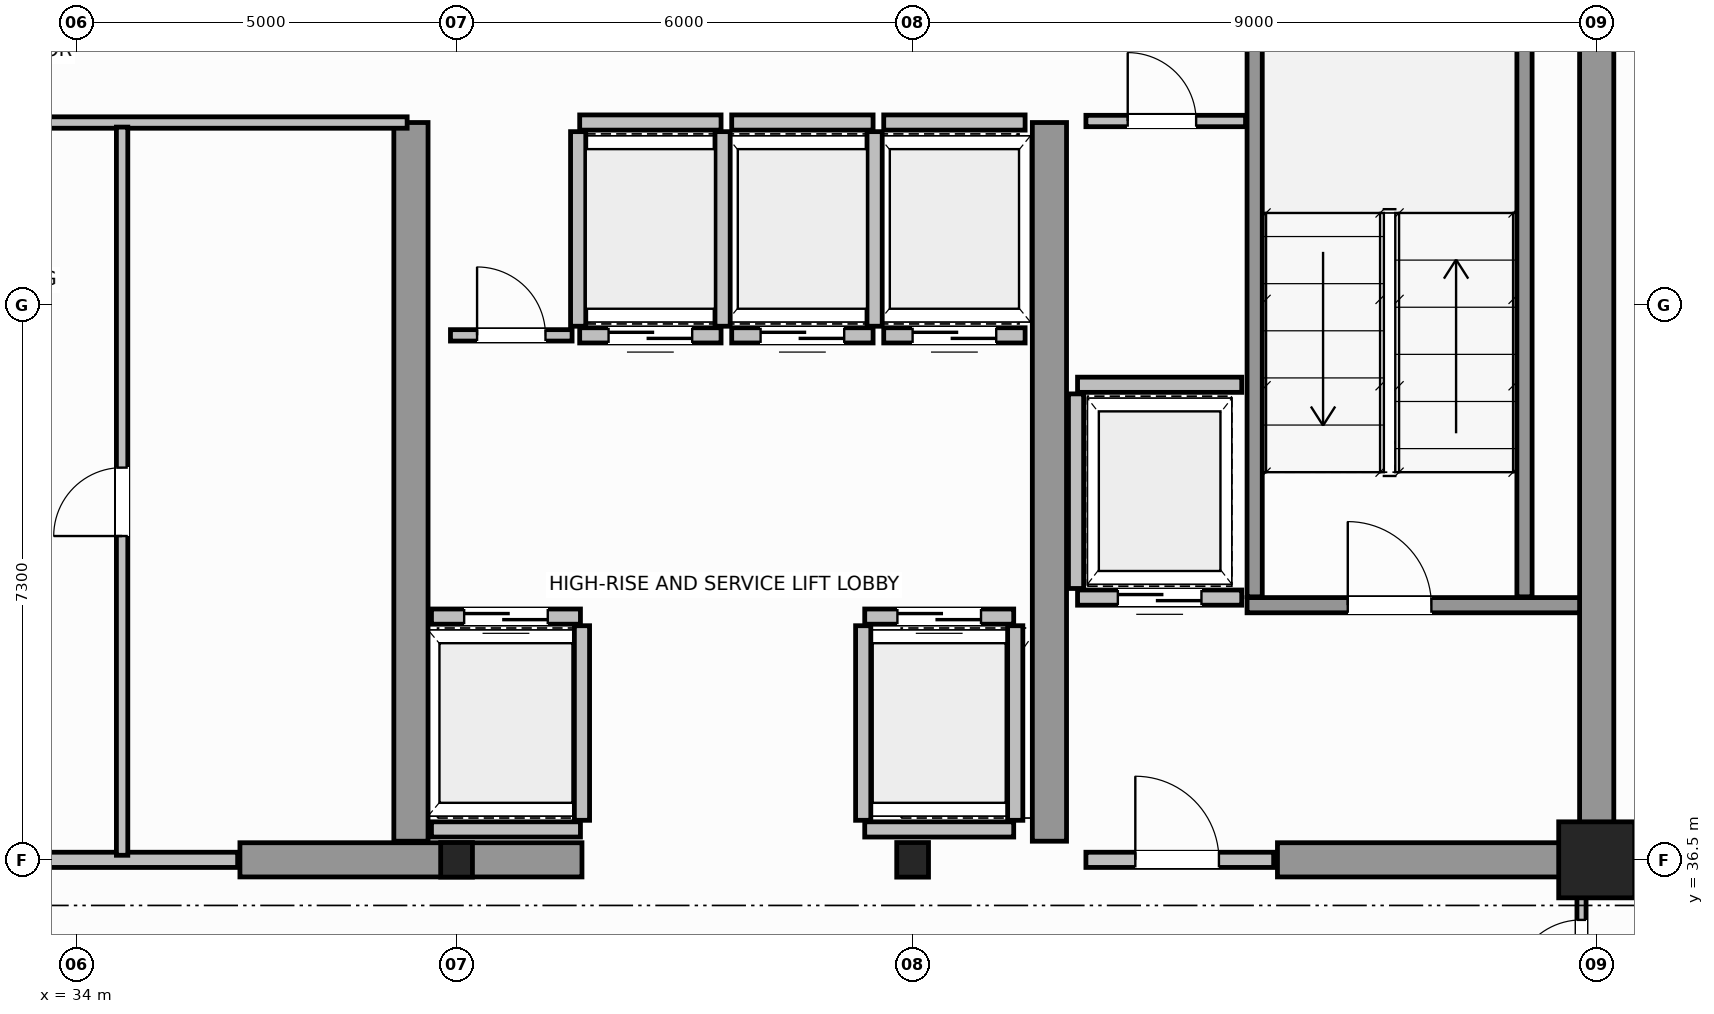
"""IFC4 building model, lengths in metres.
Left out: names, types, materials, properties, quantities, classifications, styles, units other than length and angle.
Written with IfcOpenShell. Run it as: python <this file> out.ifc"""

import sys

from ifc_helpers import new_model, si_unit, direction, frame, frame_2d, origin, origin_2d, place, context, subcontext, project, spatial, rectangle, i_section, extrude, source, transform, mapped, element, fill, save


model = new_model("IFC4")
c1 = context("Model", 3, precision=1e-05, world=origin(), true_north=direction((0.0, 1.0)))
c2 = subcontext(c1, "Body", "Model", "MODEL_VIEW")
j1 = project(units=[si_unit("LENGTHUNIT", "METRE"), si_unit("PLANEANGLEUNIT", "RADIAN")], contexts=[c1])
p1 = place(None, origin())
s1 = spatial("IfcSite", under=j1, at=p1, CompositionType="ELEMENT")
p2 = place(p1, origin())
s2 = spatial("IfcBuilding", under=s1, at=p2, CompositionType="ELEMENT")
p3 = place(p2, frame((0.0, 0.0, 249.8)))
s3 = spatial("IfcBuildingStorey", under=s2, at=p3, CompositionType="ELEMENT", Elevation=249.8)
m1 = source(origin(), c2, "Body", "SweptSolid", [
    extrude(i_section(OverallWidth=0.418, OverallDepth=0.455, WebThickness=0.042, FlangeThickness=0.058, FilletRadius=0.015, at=origin_2d()), origin(), (0.0, 0.0, 1.0), 3.8),
])
for number, where, z_axis, x_axis in (
    (1, (39.0, 36.5, 0.0), (0.0, 0.0, 1.0), (1.0, 0.0, 0.0)),
    (2, (45.0, 36.5, 0.0), (0.0, 0.0, 1.0), (1.0, 0.0, 0.0)),
):
    element("IfcColumn", number, at=place(p3, frame(where, z_axis=z_axis, x_axis=x_axis)), inside=s3, PredefinedType="COLUMN", context=c2, shape_type="MappedRepresentation", body=[
        mapped(m1, transform((0.0, 0.0, 0.0), scale=1.0)),
    ])
m2 = source(origin(), c2, "Body", "SweptSolid", [
    extrude(rectangle(XDim=1.0, YDim=1.0, at=origin_2d()), origin(), (0.0, 0.0, 1.0), 3.8),
])
p4 = place(p3, frame((54.0, 36.5, 0.0), z_axis=(0.0, 0.0, 1.0), x_axis=(1.0, 0.0, 0.0)))
e3 = element("IfcColumn", 3, at=p4, inside=s3, PredefinedType="COLUMN", context=c2, shape_type="MappedRepresentation", body=[
    mapped(m2, transform((0.0, 0.0, 0.0), scale=1.0)),
])
p5 = place(p3, frame((54.0, 36.5, 0.0), z_axis=(0.0, 0.0, 1.0), x_axis=(0.0, 1.0, 0.0)))
e4 = element("IfcWall", 4, at=p5, inside=s3, PredefinedType="SHEAR", context=c2, shape_type="SweptSolid", body=[
    extrude(rectangle(XDim=14.5, YDim=0.45, at=frame_2d((7.25, 0.0))), origin(), (0.0, 0.0, 1.0), 3.8),
])
p6 = place(p3, frame((36.15, 36.5, 0.0), z_axis=(0.0, 0.0, 1.0), x_axis=(1.0, 0.0, 0.0)))
e5 = element("IfcWall", 5, at=p6, inside=s3, PredefinedType="SHEAR", context=c2, shape_type="SweptSolid", body=[
    extrude(rectangle(XDim=4.5, YDim=0.45, at=frame_2d((2.25, 0.0))), origin(), (0.0, 0.0, 1.0), 3.8),
])
p7 = place(p3, frame((49.8, 36.5, 0.0), z_axis=(0.0, 0.0, 1.0), x_axis=(1.0, 0.0, 0.0)))
e6 = element("IfcWall", 6, at=p7, inside=s3, PredefinedType="SHEAR", context=c2, shape_type="SweptSolid", body=[
    extrude(rectangle(XDim=3.955, YDim=0.45, at=frame_2d((1.978, 0.0))), origin(), (0.0, 0.0, 1.0), 2.58),
])
for number, where, z_axis, x_axis in (
    (7, (38.4, 36.745, 0.0), (0.0, 0.0, 1.0), (0.0, 1.0, 0.0)),
    (8, (46.8, 36.745, 0.0), (0.0, 0.0, 1.0), (0.0, 1.0, 0.0)),
):
    element("IfcWall", number, at=place(p3, frame(where, z_axis=z_axis, x_axis=x_axis)), inside=s3, PredefinedType="SHEAR", context=c2, shape_type="SweptSolid", body=[
        extrude(rectangle(XDim=9.455, YDim=0.45, at=frame_2d((4.728, 0.0))), origin(), (0.0, 0.0, 1.0), 3.8),
    ])
p8 = place(p3, frame((49.4, 39.85, 0.0), z_axis=(0.0, 0.0, 1.0), x_axis=(1.0, 0.0, 0.0)))
e9 = element("IfcWall", 9, at=p8, inside=s3, PredefinedType="SOLIDWALL", context=c2, shape_type="SweptSolid", body=[
    extrude(rectangle(XDim=4.375, YDim=0.2, at=frame_2d((2.188, 0.0))), origin(), (0.0, 0.0, 1.0), 3.8),
])
p9 = place(p8, frame((1.325, 0.0, 0.0)))
e10 = element("IfcOpeningElement", 10, at=p9, cuts=e9, PredefinedType="OPENING", context=c2, shape_type="SweptSolid", body=[
    extrude(rectangle(XDim=1.1, YDim=2.15, at=frame_2d((0.55, 1.075))), frame((0.0, 0.11, 0.0), z_axis=(0.0, -1.0, 0.0), x_axis=(1.0, 0.0, 0.0)), (0.0, 0.0, 1.0), 0.22),
])
for number, where, z_axis, x_axis in (
    (11, (49.5, 39.96, 0.0), (0.0, 0.0, 1.0), (0.0, 1.0, 0.0)),
    (12, (53.05, 39.96, 0.0), (0.0, 0.0, 1.0), (0.0, 1.0, 0.0)),
):
    element("IfcWall", number, at=place(p3, frame(where, z_axis=z_axis, x_axis=x_axis)), inside=s3, PredefinedType="SOLIDWALL", context=c2, shape_type="SweptSolid", body=[
        extrude(rectangle(XDim=9.93, YDim=0.2, at=frame_2d((4.965, 0.0))), origin(), (0.0, 0.0, 1.0), 3.8),
    ])
p10 = place(p3, frame((47.28, 36.5, 0.0), z_axis=(0.0, 0.0, 1.0), x_axis=(1.0, 0.0, 0.0)))
e13 = element("IfcWall", 13, at=p10, inside=s3, PredefinedType="SOLIDWALL", context=c2, shape_type="SweptSolid", body=[
    extrude(rectangle(XDim=2.47, YDim=0.2, at=frame_2d((1.235, 0.0))), origin(), (0.0, 0.0, 1.0), 2.57),
])
p11 = place(p10, frame((0.65, 0.0, 0.0)))
e14 = element("IfcOpeningElement", 14, at=p11, cuts=e13, PredefinedType="OPENING", context=c2, shape_type="SweptSolid", body=[
    extrude(rectangle(XDim=1.1, YDim=2.15, at=frame_2d((0.55, 1.075))), frame((0.0, 0.11, 0.0), z_axis=(0.0, -1.0, 0.0), x_axis=(1.0, 0.0, 0.0)), (0.0, 0.0, 1.0), 0.22),
])
p12 = place(p3, frame((38.67, 39.7, 0.0), z_axis=(0.0, 0.0, 1.0), x_axis=(1.0, 0.0, 0.0)))
e15 = element("IfcWall", 15, at=p12, inside=s3, PredefinedType="SOLIDWALL", context=c2, shape_type="SweptSolid", body=[
    extrude(rectangle(XDim=1.96, YDim=0.2, at=frame_2d((0.98, 0.0))), origin(), (0.0, 0.0, 1.0), 3.58),
])
p13 = place(p12, frame((0.43, 0.0, 0.0)))
e16 = element("IfcOpeningElement", 16, at=p13, cuts=e15, PredefinedType="OPENING", context=c2, shape_type="SweptSolid", body=[
    extrude(rectangle(XDim=1.1, YDim=2.15, at=frame_2d((0.55, 1.075))), frame((0.0, 0.11, 0.0), z_axis=(0.0, -1.0, 0.0), x_axis=(1.0, 0.0, 0.0)), (0.0, 0.0, 1.0), 0.22),
])
p14 = place(p3, frame((38.67, 36.9, 0.0), z_axis=(0.0, 0.0, 1.0), x_axis=(1.0, 0.0, 0.0)))
e17 = element("IfcWall", 17, at=p14, inside=s3, PredefinedType="SOLIDWALL", context=c2, shape_type="SweptSolid", body=[
    extrude(rectangle(XDim=1.96, YDim=0.2, at=frame_2d((0.98, 0.0))), origin(), (0.0, 0.0, 1.0), 3.58),
])
p15 = place(p3, frame((40.65, 37.02, 0.0), z_axis=(0.0, 0.0, 1.0), x_axis=(0.0, 1.0, 0.0)))
e18 = element("IfcWall", 18, at=p15, inside=s3, PredefinedType="SOLIDWALL", context=c2, shape_type="SweptSolid", body=[
    extrude(rectangle(XDim=2.56, YDim=0.2, at=frame_2d((1.28, 0.0))), origin(), (0.0, 0.0, 1.0), 3.58),
])
p16 = place(p3, frame((44.37, 39.7, 0.0), z_axis=(0.0, 0.0, 1.0), x_axis=(1.0, 0.0, 0.0)))
e19 = element("IfcWall", 19, at=p16, inside=s3, PredefinedType="SOLIDWALL", context=c2, shape_type="SweptSolid", body=[
    extrude(rectangle(XDim=1.96, YDim=0.2, at=frame_2d((0.98, 0.0))), origin(), (0.0, 0.0, 1.0), 3.58),
])
p17 = place(p16, frame((0.43, 0.0, 0.0)))
e20 = element("IfcOpeningElement", 20, at=p17, cuts=e19, PredefinedType="OPENING", context=c2, shape_type="SweptSolid", body=[
    extrude(rectangle(XDim=1.1, YDim=2.15, at=frame_2d((0.55, 1.075))), frame((0.0, 0.11, 0.0), z_axis=(0.0, -1.0, 0.0), x_axis=(1.0, 0.0, 0.0)), (0.0, 0.0, 1.0), 0.22),
])
p18 = place(p3, frame((44.37, 36.9, 0.0), z_axis=(0.0, 0.0, 1.0), x_axis=(1.0, 0.0, 0.0)))
e21 = element("IfcWall", 21, at=p18, inside=s3, PredefinedType="SOLIDWALL", context=c2, shape_type="SweptSolid", body=[
    extrude(rectangle(XDim=1.96, YDim=0.2, at=frame_2d((0.98, 0.0))), origin(), (0.0, 0.0, 1.0), 2.57),
])
for number, where, z_axis, x_axis in (
    (22, (44.35, 37.02, 0.0), (0.0, 0.0, 1.0), (0.0, 1.0, 0.0)),
    (23, (46.35, 37.02, 0.0), (0.0, 0.0, 1.0), (0.0, 1.0, 0.0)),
):
    element("IfcWall", number, at=place(p3, frame(where, z_axis=z_axis, x_axis=x_axis)), inside=s3, PredefinedType="SOLIDWALL", context=c2, shape_type="SweptSolid", body=[
        extrude(rectangle(XDim=2.56, YDim=0.2, at=frame_2d((1.28, 0.0))), origin(), (0.0, 0.0, 1.0), 3.58),
    ])
p19 = place(p3, frame((40.62, 43.4, 0.0), z_axis=(0.0, 0.0, 1.0), x_axis=(1.0, 0.0, 0.0)))
e24 = element("IfcWall", 24, at=p19, inside=s3, PredefinedType="SOLIDWALL", context=c2, shape_type="SweptSolid", body=[
    extrude(rectangle(XDim=1.86, YDim=0.2, at=frame_2d((0.93, 0.0))), origin(), (0.0, 0.0, 1.0), 3.58),
])
p20 = place(p19, frame((0.38, 0.0, 0.0)))
e25 = element("IfcOpeningElement", 25, at=p20, cuts=e24, PredefinedType="OPENING", context=c2, shape_type="SweptSolid", body=[
    extrude(rectangle(XDim=1.1, YDim=2.15, at=frame_2d((0.55, 1.075))), frame((0.0, 0.11, 0.0), z_axis=(0.0, -1.0, 0.0), x_axis=(1.0, 0.0, 0.0)), (0.0, 0.0, 1.0), 0.22),
])
p21 = place(p3, frame((40.62, 46.2, 0.0), z_axis=(0.0, 0.0, 1.0), x_axis=(1.0, 0.0, 0.0)))
e26 = element("IfcWall", 26, at=p21, inside=s3, PredefinedType="SOLIDWALL", context=c2, shape_type="SweptSolid", body=[
    extrude(rectangle(XDim=1.86, YDim=0.2, at=frame_2d((0.93, 0.0))), origin(), (0.0, 0.0, 1.0), 3.58),
])
for number, where, z_axis, x_axis in (
    (27, (40.6, 43.52, 0.0), (0.0, 0.0, 1.0), (0.0, 1.0, 0.0)),
    (28, (42.5, 43.52, 0.0), (0.0, 0.0, 1.0), (0.0, 1.0, 0.0)),
):
    element("IfcWall", number, at=place(p3, frame(where, z_axis=z_axis, x_axis=x_axis)), inside=s3, PredefinedType="SOLIDWALL", context=c2, shape_type="SweptSolid", body=[
        extrude(rectangle(XDim=2.56, YDim=0.2, at=frame_2d((1.28, 0.0))), origin(), (0.0, 0.0, 1.0), 3.58),
    ])
p22 = place(p3, frame((42.62, 43.4, 0.0), z_axis=(0.0, 0.0, 1.0), x_axis=(1.0, 0.0, 0.0)))
e29 = element("IfcWall", 29, at=p22, inside=s3, PredefinedType="SOLIDWALL", context=c2, shape_type="SweptSolid", body=[
    extrude(rectangle(XDim=1.86, YDim=0.2, at=frame_2d((0.93, 0.0))), origin(), (0.0, 0.0, 1.0), 3.58),
])
p23 = place(p22, frame((0.38, 0.0, 0.0)))
e30 = element("IfcOpeningElement", 30, at=p23, cuts=e29, PredefinedType="OPENING", context=c2, shape_type="SweptSolid", body=[
    extrude(rectangle(XDim=1.1, YDim=2.15, at=frame_2d((0.55, 1.075))), frame((0.0, 0.11, 0.0), z_axis=(0.0, -1.0, 0.0), x_axis=(1.0, 0.0, 0.0)), (0.0, 0.0, 1.0), 0.22),
])
p24 = place(p3, frame((42.62, 46.2, 0.0), z_axis=(0.0, 0.0, 1.0), x_axis=(1.0, 0.0, 0.0)))
e31 = element("IfcWall", 31, at=p24, inside=s3, PredefinedType="SOLIDWALL", context=c2, shape_type="SweptSolid", body=[
    extrude(rectangle(XDim=1.86, YDim=0.2, at=frame_2d((0.93, 0.0))), origin(), (0.0, 0.0, 1.0), 3.58),
])
p25 = place(p3, frame((44.5, 43.52, 0.0), z_axis=(0.0, 0.0, 1.0), x_axis=(0.0, 1.0, 0.0)))
e32 = element("IfcWall", 32, at=p25, inside=s3, PredefinedType="SOLIDWALL", context=c2, shape_type="SweptSolid", body=[
    extrude(rectangle(XDim=2.56, YDim=0.2, at=frame_2d((1.28, 0.0))), origin(), (0.0, 0.0, 1.0), 3.58),
])
p26 = place(p3, frame((44.62, 43.4, 0.0), z_axis=(0.0, 0.0, 1.0), x_axis=(1.0, 0.0, 0.0)))
e33 = element("IfcWall", 33, at=p26, inside=s3, PredefinedType="SOLIDWALL", context=c2, shape_type="SweptSolid", body=[
    extrude(rectangle(XDim=1.86, YDim=0.2, at=frame_2d((0.93, 0.0))), origin(), (0.0, 0.0, 1.0), 3.58),
])
p27 = place(p26, frame((0.38, 0.0, 0.0)))
e34 = element("IfcOpeningElement", 34, at=p27, cuts=e33, PredefinedType="OPENING", context=c2, shape_type="SweptSolid", body=[
    extrude(rectangle(XDim=1.1, YDim=2.15, at=frame_2d((0.55, 1.075))), frame((0.0, 0.11, 0.0), z_axis=(0.0, -1.0, 0.0), x_axis=(1.0, 0.0, 0.0)), (0.0, 0.0, 1.0), 0.22),
])
p28 = place(p3, frame((44.62, 46.2, 0.0), z_axis=(0.0, 0.0, 1.0), x_axis=(1.0, 0.0, 0.0)))
e35 = element("IfcWall", 35, at=p28, inside=s3, PredefinedType="SOLIDWALL", context=c2, shape_type="SweptSolid", body=[
    extrude(rectangle(XDim=1.86, YDim=0.2, at=frame_2d((0.93, 0.0))), origin(), (0.0, 0.0, 1.0), 3.58),
])
p29 = place(p3, frame((47.17, 39.95, 0.0), z_axis=(0.0, 0.0, 1.0), x_axis=(1.0, 0.0, 0.0)))
e36 = element("IfcWall", 36, at=p29, inside=s3, PredefinedType="SOLIDWALL", context=c2, shape_type="SweptSolid", body=[
    extrude(rectangle(XDim=2.16, YDim=0.2, at=frame_2d((1.08, 0.0))), origin(), (0.0, 0.0, 1.0), 3.58),
])
p30 = place(p29, frame((0.53, 0.0, 0.0)))
e37 = element("IfcOpeningElement", 37, at=p30, cuts=e36, PredefinedType="OPENING", context=c2, shape_type="SweptSolid", body=[
    extrude(rectangle(XDim=1.1, YDim=2.15, at=frame_2d((0.55, 1.075))), frame((0.0, 0.11, 0.0), z_axis=(0.0, -1.0, 0.0), x_axis=(1.0, 0.0, 0.0)), (0.0, 0.0, 1.0), 0.22),
])
p31 = place(p3, frame((47.17, 42.75, 0.0), z_axis=(0.0, 0.0, 1.0), x_axis=(1.0, 0.0, 0.0)))
e38 = element("IfcWall", 38, at=p31, inside=s3, PredefinedType="SOLIDWALL", context=c2, shape_type="SweptSolid", body=[
    extrude(rectangle(XDim=2.16, YDim=0.2, at=frame_2d((1.08, 0.0))), origin(), (0.0, 0.0, 1.0), 3.58),
])
p32 = place(p3, frame((47.15, 40.07, 0.0), z_axis=(0.0, 0.0, 1.0), x_axis=(0.0, 1.0, 0.0)))
e39 = element("IfcWall", 39, at=p32, inside=s3, PredefinedType="SOLIDWALL", context=c2, shape_type="SweptSolid", body=[
    extrude(rectangle(XDim=2.56, YDim=0.2, at=frame_2d((1.28, 0.0))), origin(), (0.0, 0.0, 1.0), 3.58),
])
p33 = place(p3, frame((32.08, 36.5, 0.0), z_axis=(0.0, 0.0, 1.0), x_axis=(1.0, 0.0, 0.0)))
e40 = element("IfcWall", 40, at=p33, inside=s3, PredefinedType="SOLIDWALL", context=c2, shape_type="SweptSolid", body=[
    extrude(rectangle(XDim=4.04, YDim=0.2, at=frame_2d((2.02, 0.0))), origin(), (0.0, 0.0, 1.0), 3.02),
])
p34 = place(p33, frame((0.45, 0.0, 0.0)))
e41 = element("IfcOpeningElement", 41, at=p34, cuts=e40, PredefinedType="OPENING", context=c2, shape_type="SweptSolid", body=[
    extrude(rectangle(XDim=1.1, YDim=2.15, at=frame_2d((0.55, 1.075))), frame((0.0, 0.11, 0.0), z_axis=(0.0, -1.0, 0.0), x_axis=(1.0, 0.0, 0.0)), (0.0, 0.0, 1.0), 0.22),
])
p35 = place(p3, frame((29.85, 46.2, 0.0), z_axis=(0.0, 0.0, 1.0), x_axis=(1.0, 0.0, 0.0)))
e42 = element("IfcWall", 42, at=p35, inside=s3, PredefinedType="PARTITIONING", context=c2, shape_type="SweptSolid", body=[
    extrude(rectangle(XDim=8.5, YDim=0.15, at=frame_2d((4.25, 0.0))), origin(), (0.0, 0.0, 1.0), 3.58),
])
p36 = place(p3, frame((34.6, 36.56, 0.0), z_axis=(0.0, 0.0, 1.0), x_axis=(0.0, 1.0, 0.0)))
e43 = element("IfcWall", 43, at=p36, inside=s3, PredefinedType="PARTITIONING", context=c2, shape_type="SweptSolid", body=[
    extrude(rectangle(XDim=9.58, YDim=0.15, at=frame_2d((4.79, 0.0))), origin(), (0.0, 0.0, 1.0), 3.58),
])
p37 = place(p36, frame((4.2, 0.0, 0.0)))
e44 = element("IfcOpeningElement", 44, at=p37, cuts=e43, PredefinedType="OPENING", context=c2, shape_type="SweptSolid", body=[
    extrude(rectangle(XDim=0.9, YDim=2.1, at=frame_2d((0.45, 1.05))), frame((0.0, 0.085, 0.0), z_axis=(0.0, -1.0, 0.0), x_axis=(1.0, 0.0, 0.0)), (0.0, 0.0, 1.0), 0.17),
])
p38 = place(p3, frame((47.28, 46.22, 0.0), z_axis=(0.0, 0.0, 1.0), x_axis=(1.0, 0.0, 0.0)))
e45 = element("IfcWall", 45, at=p38, inside=s3, PredefinedType="PARTITIONING", context=c2, shape_type="SweptSolid", body=[
    extrude(rectangle(XDim=2.1, YDim=0.15, at=frame_2d((1.05, 0.0))), origin(), (0.0, 0.0, 1.0), 3.58),
])
p39 = place(p38, frame((0.55, 0.0, 0.0)))
e46 = element("IfcOpeningElement", 46, at=p39, cuts=e45, PredefinedType="OPENING", context=c2, shape_type="SweptSolid", body=[
    extrude(rectangle(XDim=0.9, YDim=2.1, at=frame_2d((0.45, 1.05))), frame((0.0, 0.085, 0.0), z_axis=(0.0, -1.0, 0.0), x_axis=(1.0, 0.0, 0.0)), (0.0, 0.0, 1.0), 0.17),
])
p40 = place(p3, frame((38.92, 43.4, 0.0), z_axis=(0.0, 0.0, 1.0), x_axis=(1.0, 0.0, 0.0)))
e47 = element("IfcWall", 47, at=p40, inside=s3, PredefinedType="PARTITIONING", context=c2, shape_type="SweptSolid", body=[
    extrude(rectangle(XDim=1.6, YDim=0.15, at=frame_2d((0.8, 0.0))), origin(), (0.0, 0.0, 1.0), 3.58),
])
p41 = place(p40, frame((0.35, 0.0, 0.0)))
e48 = element("IfcOpeningElement", 48, at=p41, cuts=e47, PredefinedType="OPENING", context=c2, shape_type="SweptSolid", body=[
    extrude(rectangle(XDim=0.9, YDim=2.1, at=frame_2d((0.45, 1.05))), frame((0.0, 0.085, 0.0), z_axis=(0.0, -1.0, 0.0), x_axis=(1.0, 0.0, 0.0)), (0.0, 0.0, 1.0), 0.17),
])
p42 = place(p3, frame((53.8, 34.16, 0.0), z_axis=(0.0, 0.0, 1.0), x_axis=(0.0, 1.0, 0.0)))
e49 = element("IfcWall", 49, at=p42, inside=s3, PredefinedType="PARTITIONING", context=c2, shape_type="SweptSolid", body=[
    extrude(rectangle(XDim=2.28, YDim=0.12, at=frame_2d((1.14, 0.0))), origin(), (0.0, 0.0, 1.0), 3.58),
])
p43 = place(p42, frame((0.65, 0.0, 0.0)))
e50 = element("IfcOpeningElement", 50, at=p43, cuts=e49, PredefinedType="OPENING", context=c2, shape_type="SweptSolid", body=[
    extrude(rectangle(XDim=0.9, YDim=2.15, at=frame_2d((0.45, 1.075))), frame((0.0, 0.07, 0.0), z_axis=(0.0, -1.0, 0.0), x_axis=(1.0, 0.0, 0.0)), (0.0, 0.0, 1.0), 0.14),
])
m3 = source(origin(), c2, "Body", "SweptSolid", [
    extrude(rectangle(XDim=1.1, YDim=2.15, at=frame_2d((0.55, 1.075))), frame((0.0, 0.025, 0.0), z_axis=(0.0, -1.0, 0.0), x_axis=(1.0, 0.0, 0.0)), (0.0, 0.0, 1.0), 0.05),
])
p44 = place(p9, origin())
e51 = element("IfcDoor", 51, at=p44, inside=s3, OperationType="SINGLE_SWING_RIGHT", PredefinedType="DOOR", context=c2, shape_type="MappedRepresentation", body=[
    mapped(m3, transform((0.0, 0.0, 0.0), scale=1.0)),
])
fill(e10, e51)
p45 = place(p11, origin())
e52 = element("IfcDoor", 52, at=p45, inside=s3, OperationType="SINGLE_SWING_LEFT", PredefinedType="DOOR", context=c2, shape_type="MappedRepresentation", body=[
    mapped(m3, transform((0.0, 0.0, 0.0), scale=1.0)),
])
fill(e14, e52)
p46 = place(p13, origin())
e53 = element("IfcDoor", 53, at=p46, inside=s3, OperationType="DOUBLE_DOOR_SLIDING", PredefinedType="DOOR", context=c2, shape_type="MappedRepresentation", body=[
    mapped(m3, transform((0.0, 0.0, 0.0), scale=1.0)),
])
fill(e16, e53)
p47 = place(p17, origin())
e54 = element("IfcDoor", 54, at=p47, inside=s3, OperationType="DOUBLE_DOOR_SLIDING", PredefinedType="DOOR", context=c2, shape_type="MappedRepresentation", body=[
    mapped(m3, transform((0.0, 0.0, 0.0), scale=1.0)),
])
fill(e20, e54)
p48 = place(p20, origin())
e55 = element("IfcDoor", 55, at=p48, inside=s3, OperationType="DOUBLE_DOOR_SLIDING", PredefinedType="DOOR", context=c2, shape_type="MappedRepresentation", body=[
    mapped(m3, transform((0.0, 0.0, 0.0), scale=1.0)),
])
fill(e25, e55)
p49 = place(p23, origin())
e56 = element("IfcDoor", 56, at=p49, inside=s3, OperationType="DOUBLE_DOOR_SLIDING", PredefinedType="DOOR", context=c2, shape_type="MappedRepresentation", body=[
    mapped(m3, transform((0.0, 0.0, 0.0), scale=1.0)),
])
fill(e30, e56)
p50 = place(p27, origin())
e57 = element("IfcDoor", 57, at=p50, inside=s3, OperationType="DOUBLE_DOOR_SLIDING", PredefinedType="DOOR", context=c2, shape_type="MappedRepresentation", body=[
    mapped(m3, transform((0.0, 0.0, 0.0), scale=1.0)),
])
fill(e34, e57)
p51 = place(p30, origin())
e58 = element("IfcDoor", 58, at=p51, inside=s3, OperationType="DOUBLE_DOOR_SLIDING", PredefinedType="DOOR", context=c2, shape_type="MappedRepresentation", body=[
    mapped(m3, transform((0.0, 0.0, 0.0), scale=1.0)),
])
fill(e37, e58)
m4 = source(origin(), c2, "Body", "SweptSolid", [
    extrude(rectangle(XDim=0.9, YDim=2.1, at=frame_2d((0.45, 1.05))), frame((0.0, 0.025, 0.0), z_axis=(0.0, -1.0, 0.0), x_axis=(1.0, 0.0, 0.0)), (0.0, 0.0, 1.0), 0.05),
])
p52 = place(p37, origin())
e59 = element("IfcDoor", 59, at=p52, inside=s3, OperationType="SINGLE_SWING_RIGHT", PredefinedType="DOOR", context=c2, shape_type="MappedRepresentation", body=[
    mapped(m4, transform((0.0, 0.0, 0.0), scale=1.0)),
])
fill(e44, e59)
p53 = place(p39, origin())
e60 = element("IfcDoor", 60, at=p53, inside=s3, OperationType="SINGLE_SWING_RIGHT", PredefinedType="DOOR", context=c2, shape_type="MappedRepresentation", body=[
    mapped(m4, transform((0.0, 0.0, 0.0), scale=1.0)),
])
fill(e46, e60)
p54 = place(p41, origin())
e61 = element("IfcDoor", 61, at=p54, inside=s3, OperationType="SINGLE_SWING_LEFT", PredefinedType="DOOR", context=c2, shape_type="MappedRepresentation", body=[
    mapped(m4, transform((0.0, 0.0, 0.0), scale=1.0)),
])
fill(e48, e61)
m5 = source(origin(), c2, "Body", "SweptSolid", [
    extrude(rectangle(XDim=0.9, YDim=2.15, at=frame_2d((0.45, 1.075))), frame((0.0, 0.025, 0.0), z_axis=(0.0, -1.0, 0.0), x_axis=(1.0, 0.0, 0.0)), (0.0, 0.0, 1.0), 0.05),
])
p55 = place(p43, origin())
e62 = element("IfcDoor", 62, at=p55, inside=s3, OperationType="SINGLE_SWING_RIGHT", PredefinedType="DOOR", context=c2, shape_type="MappedRepresentation", body=[
    mapped(m5, transform((0.0, 0.0, 0.0), scale=1.0)),
])
fill(e50, e62)
save(model, sys.argv[1])
